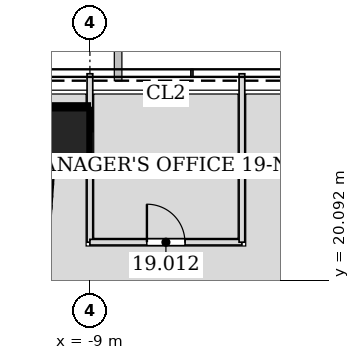
"""IFC4 building model, lengths in metres.
Left out: names, types, materials, properties, quantities, classifications, styles, units other than length and angle.
Written with IfcOpenShell. Run it as: python <this file> out.ifc"""

import sys

from ifc_helpers import new_model, si_unit, direction, frame, frame_2d, origin, origin_2d, place, context, subcontext, project, spatial, rectangle, hollow_rectangle, extrude, element, fill, save


model = new_model("IFC4")
c1 = context("Model", 3, precision=1e-05, world=origin(), true_north=direction((0.0, 1.0)))
c2 = subcontext(c1, "Body", "Model", "MODEL_VIEW")
j1 = project(units=[si_unit("LENGTHUNIT", "METRE"), si_unit("PLANEANGLEUNIT", "RADIAN")], contexts=[c1])
p1 = place(None, origin())
s1 = spatial("IfcSite", under=j1, at=p1, CompositionType="ELEMENT")
p2 = place(p1, origin())
s2 = spatial("IfcBuilding", under=s1, at=p2, CompositionType="ELEMENT")
p3 = place(p2, frame((0.0, 0.0, 87.6)))
s3 = spatial("IfcBuildingStorey", under=s2, at=p3, CompositionType="ELEMENT", Elevation=87.6)
p4 = place(p3, frame((-9.883, 23.858, 0.0), z_axis=(0.011736627314, -0.028295730207, 0.99953069149), x_axis=(0.923693003589, 0.383133442967, 0.0)))
e1 = element("IfcColumn", 1, at=p4, inside=s3, PredefinedType="COLUMN", context=c2, shape_type="SweptSolid", body=[
    extrude(hollow_rectangle(XDim=1.7, YDim=1.7, WallThickness=0.08, at=origin_2d()), origin(), (0.0, 0.0, 1.0), 4.202),
])
p5 = place(p3, frame((-9.0, 25.519, 0.0), z_axis=(0.0, 0.0, 1.0), x_axis=(0.0, -1.0, 0.0)))
e2 = element("IfcWall", 2, at=p5, inside=s3, PredefinedType="PARTITIONING", context=c2, shape_type="SweptSolid", body=[
    extrude(rectangle(XDim=1.52, YDim=0.15, at=frame_2d((0.76, 0.0))), origin(), (0.0, 0.0, 1.0), 4.035),
])
p6 = place(p3, frame((-9.0, 23.144, 0.0), z_axis=(0.0, 0.0, 1.0), x_axis=(0.0, -1.0, 0.0)))
e3 = element("IfcWall", 3, at=p6, inside=s3, PredefinedType="PARTITIONING", context=c2, shape_type="SweptSolid", body=[
    extrude(rectangle(XDim=2.057, YDim=0.15, at=frame_2d((1.029, 0.0))), origin(), (0.0, 0.0, 1.0), 3.423),
])
p7 = place(p3, frame((-9.0, 21.087, 0.0), z_axis=(0.0, 0.0, 1.0), x_axis=(1.0, 0.0, 0.0)))
e4 = element("IfcWall", 4, at=p7, inside=s3, PredefinedType="PARTITIONING", context=c2, shape_type="SweptSolid", body=[
    extrude(rectangle(XDim=4.0, YDim=0.15, at=frame_2d((2.0, 0.0))), origin(), (0.0, 0.0, 1.0), 4.035),
])
p8 = place(p7, frame((1.5, 0.0, 0.0)))
e5 = element("IfcOpeningElement", 5, at=p8, cuts=e4, PredefinedType="OPENING", context=c2, shape_type="SweptSolid", body=[
    extrude(rectangle(XDim=1.0, YDim=2.1, at=frame_2d((0.5, 1.05))), frame((0.0, 0.085, 0.0), z_axis=(0.0, -1.0, 0.0), x_axis=(1.0, 0.0, 0.0)), (0.0, 0.0, 1.0), 0.17),
])
p9 = place(p3, frame((-5.0, 21.087, 0.0), z_axis=(0.0, 0.0, 1.0), x_axis=(0.0, 1.0, 0.0)))
e6 = element("IfcWall", 6, at=p9, inside=s3, PredefinedType="PARTITIONING", context=c2, shape_type="SweptSolid", body=[
    extrude(rectangle(XDim=4.432, YDim=0.15, at=frame_2d((2.216, 0.0))), origin(), (0.0, 0.0, 1.0), 3.423),
])
p10 = place(p8, origin())
e7 = element("IfcDoor", 7, at=p10, inside=s3, OperationType="SINGLE_SWING_LEFT", PredefinedType="DOOR", context=c2, shape_type="SweptSolid", body=[
    extrude(rectangle(XDim=1.0, YDim=2.1, at=frame_2d((0.5, 1.05))), frame((0.0, 0.025, 0.0), z_axis=(0.0, -1.0, 0.0), x_axis=(1.0, 0.0, 0.0)), (0.0, 0.0, 1.0), 0.05),
])
fill(e5, e7)
save(model, sys.argv[1])
